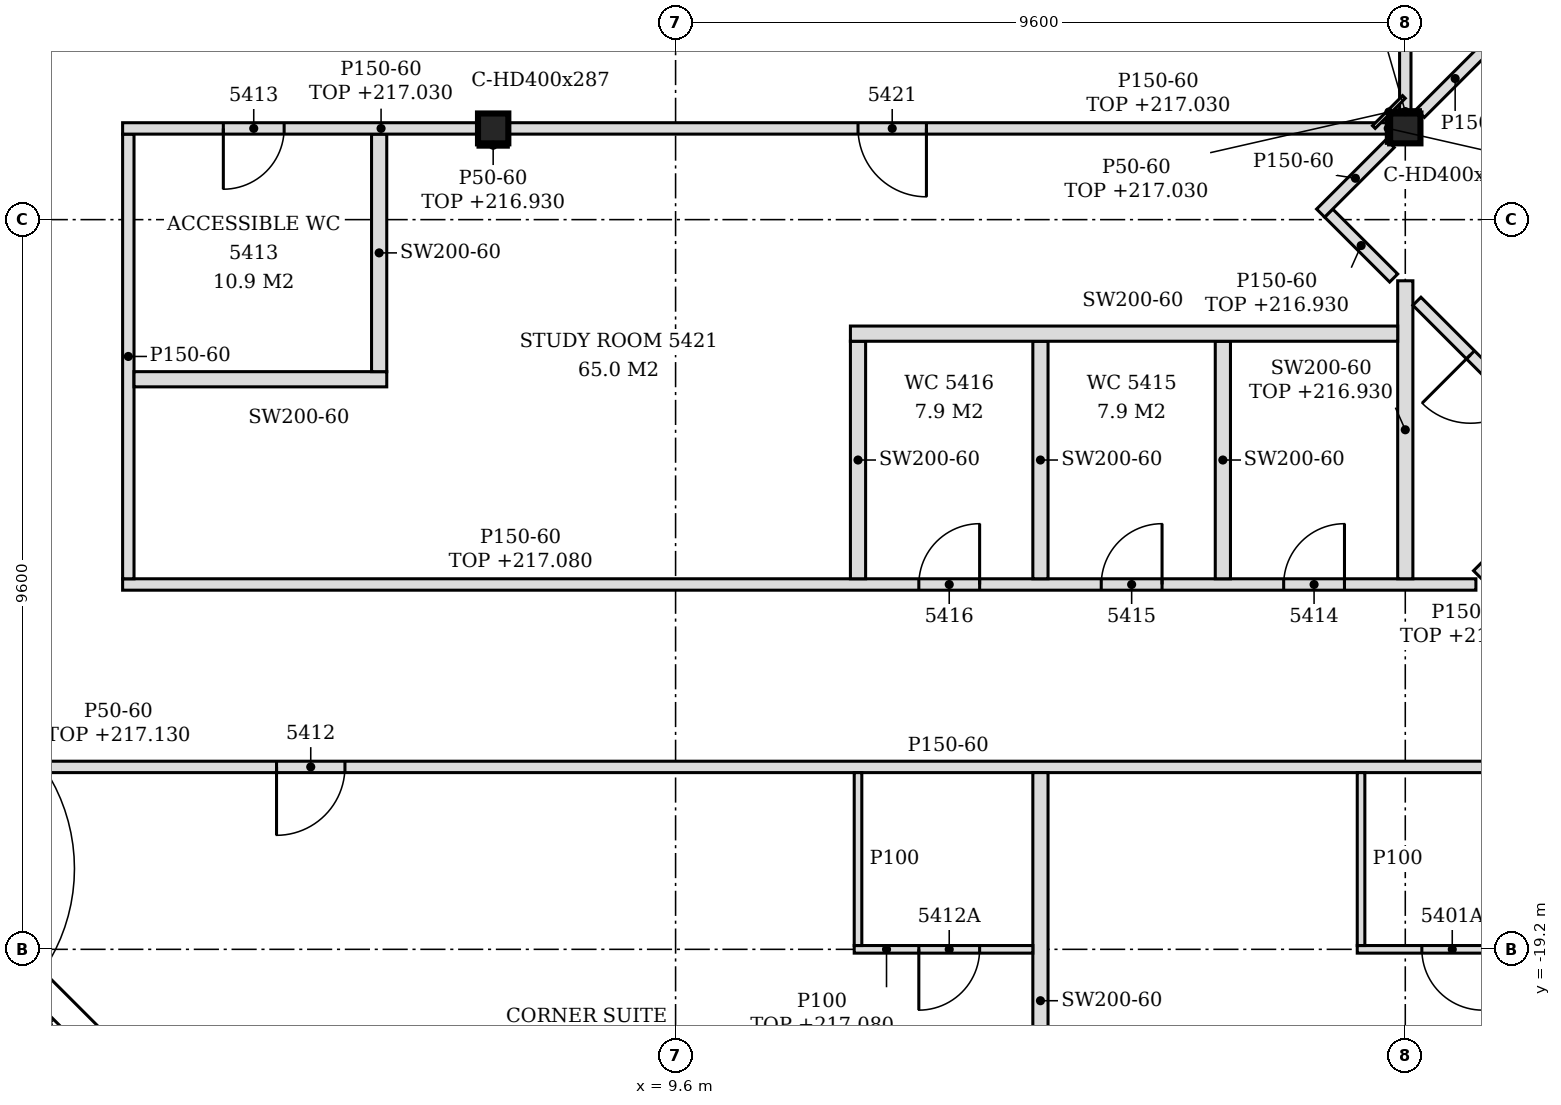
"""IFC4 building model, lengths in metres.
Left out: names, types, materials, properties, quantities, classifications, styles, units other than length and angle.
Written with IfcOpenShell. Run it as: python <this file> out.ifc"""

import sys

from ifc_helpers import new_model, si_unit, direction, frame, frame_2d, origin, origin_2d, place, context, subcontext, project, spatial, polyline, rectangle, i_section, outline, extrude, element, fill, save


model = new_model("IFC4")
c1 = context("Model", 3, precision=1e-05, world=origin(), true_north=direction((0.0, 1.0)))
c2 = subcontext(c1, "Body", "Model", "MODEL_VIEW")
j1 = project(units=[si_unit("LENGTHUNIT", "METRE"), si_unit("PLANEANGLEUNIT", "RADIAN")], contexts=[c1])
p1 = place(None, origin())
s1 = spatial("IfcSite", under=j1, at=p1, CompositionType="ELEMENT")
p2 = place(p1, origin())
s2 = spatial("IfcBuilding", under=s1, at=p2, CompositionType="ELEMENT")
p3 = place(p2, frame((0.0, 0.0, 214.2)))
s3 = spatial("IfcBuildingStorey", under=s2, at=p3, CompositionType="ELEMENT", Elevation=214.2)
for number, where, z_axis, x_axis in (
    (1, (7.2, -8.4, -0.15), (0.0, 0.0, 1.0), (1.0, 0.0, 0.0)),
    (2, (19.2, -8.4, -0.15), (0.0, 0.0, 1.0), (1.0, 0.0, 0.0)),
):
    element("IfcColumn", number, at=place(p3, frame(where, z_axis=z_axis, x_axis=x_axis)), inside=s3, PredefinedType="COLUMN", context=c2, shape_type="SweptSolid", body=[
        extrude(i_section(OverallWidth=0.399, OverallDepth=0.393, WebThickness=0.023, FlangeThickness=0.037, FilletRadius=0.015, at=origin_2d()), origin(), (0.0, 0.0, 1.0), 3.6),
    ])
p4 = place(p3, frame((-1.427, -17.42, 0.0), z_axis=(0.0, 0.0, 1.0), x_axis=(0.707106781187, -0.707106781187, 0.0)))
e3 = element("IfcWall", 3, at=p4, inside=s3, PredefinedType="NOTDEFINED", context=c2, shape_type="SweptSolid", body=[
    extrude(rectangle(XDim=4.431, YDim=0.2, at=frame_2d((2.216, 0.0))), origin(), (0.0, 0.0, 1.0), 3.45),
])
p5 = place(p4, frame((1.015, 0.0, 0.0)))
e4 = element("IfcOpeningElement", 4, at=p5, cuts=e3, PredefinedType="OPENING", context=c2, shape_type="SweptSolid", body=[
    extrude(rectangle(XDim=2.4, YDim=2.4, at=frame_2d((1.2, 1.2))), frame((0.0, 0.11, 0.0), z_axis=(0.0, -1.0, 0.0), x_axis=(1.0, 0.0, 0.0)), (0.0, 0.0, 1.0), 0.22),
])
p6 = place(p3, frame((14.4, -22.877, 0.0), z_axis=(0.0, 0.0, 1.0), x_axis=(0.0, 1.0, 0.0)))
e5 = element("IfcWall", 5, at=p6, inside=s3, PredefinedType="PARTITIONING", context=c2, shape_type="SweptSolid", body=[
    extrude(outline(polyline([(0.0, 0.0), (6.002, 0.0), (6.002, 3.45), (3.782, 3.45), (3.78, 2.88), (3.572, 2.88), (3.57, 3.45), (0.0, 3.45), (0.0, 0.0)])), frame((0.0, 0.1, 0.0), z_axis=(0.0, -1.0, 0.0), x_axis=(1.0, 0.0, 0.0)), (0.0, 0.0, 1.0), 0.2),
])
p7 = place(p3, frame((11.95, -19.2, 0.0), z_axis=(0.0, 0.0, 1.0), x_axis=(1.0, 0.0, 0.0)))
e6 = element("IfcWall", 6, at=p7, inside=s3, PredefinedType="PARTITIONING", context=c2, shape_type="SweptSolid", body=[
    extrude(rectangle(XDim=2.35, YDim=0.1, at=frame_2d((1.175, 0.0))), origin(), (0.0, 0.0, 1.0), 2.88),
])
p8 = place(p7, frame((0.85, 0.0, 0.0)))
e7 = element("IfcOpeningElement", 7, at=p8, cuts=e6, PredefinedType="OPENING", context=c2, shape_type="SweptSolid", body=[
    extrude(rectangle(XDim=0.8, YDim=2.1, at=frame_2d((0.4, 1.05))), frame((0.0, 0.06, 0.0), z_axis=(0.0, -1.0, 0.0), x_axis=(1.0, 0.0, 0.0)), (0.0, 0.0, 1.0), 0.12),
])
p9 = place(p3, frame((18.568, -19.2, 0.0), z_axis=(0.0, 0.0, 1.0), x_axis=(1.0, 0.0, 0.0)))
e8 = element("IfcWall", 8, at=p9, inside=s3, PredefinedType="PARTITIONING", context=c2, shape_type="SweptSolid", body=[
    extrude(outline(polyline([(0.0, 0.0), (2.5, 0.0), (2.5, 2.88), (0.782, 2.88), (0.78, 2.73), (0.482, 2.73), (0.48, 2.88), (0.0, 2.88), (0.0, 0.0)])), frame((0.0, 0.05, 0.0), z_axis=(0.0, -1.0, 0.0), x_axis=(1.0, 0.0, 0.0)), (0.0, 0.0, 1.0), 0.1),
])
p10 = place(p9, frame((0.85, 0.0, 0.0)))
e9 = element("IfcOpeningElement", 9, at=p10, cuts=e8, PredefinedType="OPENING", context=c2, shape_type="SweptSolid", body=[
    extrude(rectangle(XDim=0.8, YDim=2.1, at=frame_2d((0.4, 1.05))), frame((0.0, 0.06, 0.0), z_axis=(0.0, -1.0, 0.0), x_axis=(1.0, 0.0, 0.0)), (0.0, 0.0, 1.0), 0.12),
])
for number, where, z_axis, x_axis in (
    (10, (12.0, -19.15, 0.0), (0.0, 0.0, 1.0), (0.0, 1.0, 0.0)),
    (11, (18.618, -19.15, 0.0), (0.0, 0.0, 1.0), (0.0, 1.0, 0.0)),
):
    element("IfcWall", number, at=place(p3, frame(where, z_axis=z_axis, x_axis=x_axis)), inside=s3, PredefinedType="PARTITIONING", context=c2, shape_type="SweptSolid", body=[
        extrude(outline(polyline([(0.0, 0.0), (2.275, 0.0), (2.275, 3.45), (0.055, 3.45), (0.053, 2.88), (0.0, 2.88), (0.0, 0.0)])), frame((0.0, 0.05, 0.0), z_axis=(0.0, -1.0, 0.0), x_axis=(1.0, 0.0, 0.0)), (0.0, 0.0, 1.0), 0.1),
    ])
p11 = place(p3, frame((-0.844, -16.8, 0.0), z_axis=(0.0, 0.0, 1.0), x_axis=(1.0, 0.0, 0.0)))
e12 = element("IfcWall", 12, at=p11, inside=s3, PredefinedType="PARTITIONING", context=c2, shape_type="SweptSolid", body=[
    extrude(outline(polyline([(0.0, 0.0), (21.968, 0.0), (21.968, 3.45), (20.194, 3.45), (20.191, 2.73), (19.894, 2.73), (19.892, 3.45), (8.194, 3.45), (8.191, 2.73), (7.894, 2.73), (7.892, 3.45), (0.0, 3.45), (0.0, 0.0)])), frame((0.0, 0.075, 0.0), z_axis=(0.0, -1.0, 0.0), x_axis=(1.0, 0.0, 0.0)), (0.0, 0.0, 1.0), 0.15),
])
p12 = place(p11, frame((5.194, 0.0, 0.0)))
e13 = element("IfcOpeningElement", 13, at=p12, cuts=e12, PredefinedType="OPENING", context=c2, shape_type="SweptSolid", body=[
    extrude(rectangle(XDim=0.9, YDim=2.1, at=frame_2d((0.45, 1.05))), frame((0.0, 0.085, 0.0), z_axis=(0.0, -1.0, 0.0), x_axis=(1.0, 0.0, 0.0)), (0.0, 0.0, 1.0), 0.17),
])
p13 = place(p3, frame((2.325, -14.4, 0.0), z_axis=(0.0, 0.0, 1.0), x_axis=(1.0, 0.0, 0.0)))
e14 = element("IfcWall", 14, at=p13, inside=s3, PredefinedType="PARTITIONING", context=c2, shape_type="SweptSolid", body=[
    extrude(outline(polyline([(0.0, 0.0), (17.804, 0.0), (17.804, 2.88), (17.025, 2.88), (17.023, 2.73), (16.725, 2.73), (16.723, 2.88), (5.025, 2.88), (5.023, 2.73), (4.725, 2.73), (4.723, 2.88), (0.0, 2.88), (0.0, 0.0)])), frame((0.0, 0.075, 0.0), z_axis=(0.0, -1.0, 0.0), x_axis=(1.0, 0.0, 0.0)), (0.0, 0.0, 1.0), 0.15),
])
p14 = place(p13, frame((15.275, 0.0, 0.0)))
e15 = element("IfcOpeningElement", 15, at=p14, cuts=e14, PredefinedType="OPENING", context=c2, shape_type="SweptSolid", body=[
    extrude(rectangle(XDim=0.8, YDim=2.1, at=frame_2d((0.4, 1.05))), frame((0.0, 0.085, 0.0), z_axis=(0.0, -1.0, 0.0), x_axis=(1.0, 0.0, 0.0)), (0.0, 0.0, 1.0), 0.17),
])
p15 = place(p13, frame((12.875, 0.0, 0.0)))
e16 = element("IfcOpeningElement", 16, at=p15, cuts=e14, PredefinedType="OPENING", context=c2, shape_type="SweptSolid", body=[
    extrude(rectangle(XDim=0.8, YDim=2.1, at=frame_2d((0.4, 1.05))), frame((0.0, 0.085, 0.0), z_axis=(0.0, -1.0, 0.0), x_axis=(1.0, 0.0, 0.0)), (0.0, 0.0, 1.0), 0.17),
])
p16 = place(p13, frame((10.475, 0.0, 0.0)))
e17 = element("IfcOpeningElement", 17, at=p16, cuts=e14, PredefinedType="OPENING", context=c2, shape_type="SweptSolid", body=[
    extrude(rectangle(XDim=0.8, YDim=2.1, at=frame_2d((0.4, 1.05))), frame((0.0, 0.085, 0.0), z_axis=(0.0, -1.0, 0.0), x_axis=(1.0, 0.0, 0.0)), (0.0, 0.0, 1.0), 0.17),
])
p17 = place(p3, frame((2.4, -14.325, 0.0), z_axis=(0.0, 0.0, 1.0), x_axis=(0.0, 1.0, 0.0)))
e18 = element("IfcWall", 18, at=p17, inside=s3, PredefinedType="PARTITIONING", context=c2, shape_type="SweptSolid", body=[
    extrude(outline(polyline([(0.0, 0.0), (5.85, 0.0), (5.85, 2.83), (5.775, 2.83), (5.773, 3.45), (0.025, 3.45), (0.023, 2.93), (0.0, 2.93), (0.0, 0.0)])), frame((0.0, 0.075, 0.0), z_axis=(0.0, -1.0, 0.0), x_axis=(1.0, 0.0, 0.0)), (0.0, 0.0, 1.0), 0.15),
])
for number, where, z_axis, x_axis in (
    (19, (12.0, -14.325, 0.0), (0.0, 0.0, 1.0), (0.0, 1.0, 0.0)),
    (20, (14.4, -14.325, 0.0), (0.0, 0.0, 1.0), (0.0, 1.0, 0.0)),
    (21, (16.8, -14.325, 0.0), (0.0, 0.0, 1.0), (0.0, 1.0, 0.0)),
):
    element("IfcWall", number, at=place(p3, frame(where, z_axis=z_axis, x_axis=x_axis)), inside=s3, PredefinedType="PARTITIONING", context=c2, shape_type="SweptSolid", body=[
        extrude(outline(polyline([(0.0, 0.0), (3.125, 0.0), (3.125, 3.45), (0.03, 3.45), (0.028, 2.88), (0.0, 2.88), (0.0, 0.0)])), frame((0.0, 0.1, 0.0), z_axis=(0.0, -1.0, 0.0), x_axis=(1.0, 0.0, 0.0)), (0.0, 0.0, 1.0), 0.2),
    ])
p18 = place(p3, frame((19.2, -14.325, 0.0), z_axis=(0.0, 0.0, 1.0), x_axis=(0.0, 1.0, 0.0)))
e22 = element("IfcWall", 22, at=p18, inside=s3, PredefinedType="PARTITIONING", context=c2, shape_type="SweptSolid", body=[
    extrude(rectangle(XDim=3.92, YDim=0.2, at=frame_2d((1.96, 0.0))), origin(), (0.0, 0.0, 1.0), 2.73),
])
p19 = place(p3, frame((20.151, -14.272, 0.0), z_axis=(0.0, 0.0, 1.0), x_axis=(0.707106781187, 0.707106781187, 0.0)))
e23 = element("IfcWall", 23, at=p19, inside=s3, PredefinedType="PARTITIONING", context=c2, shape_type="SweptSolid", body=[
    extrude(rectangle(XDim=2.055, YDim=0.15, at=frame_2d((1.027, 0.0))), origin(), (0.0, 0.0, 1.0), 2.88),
])
p20 = place(p3, frame((21.498, -12.819, 0.0), z_axis=(0.0, 0.0, 1.0), x_axis=(-0.707106781187, 0.707106781187, 0.0)))
e24 = element("IfcWall", 24, at=p20, inside=s3, PredefinedType="PARTITIONING", context=c2, shape_type="SweptSolid", body=[
    extrude(rectangle(XDim=3.033, YDim=0.15, at=frame_2d((1.517, 0.0))), origin(), (0.0, 0.0, 1.0), 2.73),
])
p21 = place(p20, frame((1.137, 0.0, 0.0)))
e25 = element("IfcOpeningElement", 25, at=p21, cuts=e24, PredefinedType="OPENING", context=c2, shape_type="SweptSolid", body=[
    extrude(rectangle(XDim=0.9, YDim=2.1, at=frame_2d((0.45, 1.05))), frame((0.0, 0.085, 0.0), z_axis=(0.0, -1.0, 0.0), x_axis=(1.0, 0.0, 0.0)), (0.0, 0.0, 1.0), 0.17),
])
p22 = place(p3, frame((2.475, -11.7, 0.0), z_axis=(0.0, 0.0, 1.0), x_axis=(1.0, 0.0, 0.0)))
e26 = element("IfcWall", 26, at=p22, inside=s3, PredefinedType="PARTITIONING", context=c2, shape_type="SweptSolid", body=[
    extrude(rectangle(XDim=3.325, YDim=0.2, at=frame_2d((1.663, 0.0))), origin(), (0.0, 0.0, 1.0), 3.45),
])
p23 = place(p3, frame((5.7, -11.6, 0.0), z_axis=(0.0, 0.0, 1.0), x_axis=(0.0, 1.0, 0.0)))
e27 = element("IfcWall", 27, at=p23, inside=s3, PredefinedType="PARTITIONING", context=c2, shape_type="SweptSolid", body=[
    extrude(outline(polyline([(0.0, 0.0), (3.125, 0.0), (3.125, 2.83), (3.05, 2.83), (3.048, 3.45), (0.0, 3.45), (0.0, 0.0)])), frame((0.0, 0.1, 0.0), z_axis=(0.0, -1.0, 0.0), x_axis=(1.0, 0.0, 0.0)), (0.0, 0.0, 1.0), 0.2),
])
p24 = place(p3, frame((11.9, -11.1, 0.0), z_axis=(0.0, 0.0, 1.0), x_axis=(1.0, 0.0, 0.0)))
e28 = element("IfcWall", 28, at=p24, inside=s3, PredefinedType="PARTITIONING", context=c2, shape_type="SweptSolid", body=[
    extrude(outline(polyline([(0.0, 0.0), (7.2, 0.0), (7.2, 2.73), (7.15, 2.73), (7.148, 3.45), (0.0, 3.45), (0.0, 0.0)])), frame((0.0, 0.1, 0.0), z_axis=(0.0, -1.0, 0.0), x_axis=(1.0, 0.0, 0.0)), (0.0, 0.0, 1.0), 0.2),
])
p25 = place(p3, frame((19.047, -10.368, 0.0), z_axis=(0.0, 0.0, 1.0), x_axis=(-0.707409718716, 0.706803713817, 0.0)))
e29 = element("IfcWall", 29, at=p25, inside=s3, PredefinedType="PARTITIONING", context=c2, shape_type="SweptSolid", body=[
    extrude(rectangle(XDim=1.208, YDim=0.15, at=frame_2d((0.604, 0.0))), origin(), (0.0, 0.0, 1.0), 2.73),
])
p26 = place(p3, frame((18.086, -9.514, 0.0), z_axis=(0.0, 0.0, 1.0), x_axis=(0.707106781187, 0.707106781187, 0.0)))
e30 = element("IfcWall", 30, at=p26, inside=s3, PredefinedType="PARTITIONING", context=c2, shape_type="SweptSolid", body=[
    extrude(rectangle(XDim=1.295, YDim=0.15, at=frame_2d((0.648, 0.0))), origin(), (0.0, 0.0, 1.0), 3.45),
])
p27 = place(p3, frame((2.325, -8.4, 0.0), z_axis=(0.0, 0.0, 1.0), x_axis=(1.0, 0.0, 0.0)))
e31 = element("IfcWall", 31, at=p27, inside=s3, PredefinedType="PARTITIONING", context=c2, shape_type="SweptSolid", body=[
    extrude(rectangle(XDim=4.676, YDim=0.15, at=frame_2d((2.338, 0.0))), origin(), (0.0, 0.0, 1.0), 2.83),
])
p28 = place(p27, frame((1.325, 0.0, 0.0)))
e32 = element("IfcOpeningElement", 32, at=p28, cuts=e31, PredefinedType="OPENING", context=c2, shape_type="SweptSolid", body=[
    extrude(rectangle(XDim=0.8, YDim=2.1, at=frame_2d((0.4, 1.05))), frame((0.0, 0.085, 0.0), z_axis=(0.0, -1.0, 0.0), x_axis=(1.0, 0.0, 0.0)), (0.0, 0.0, 1.0), 0.17),
])
p29 = place(p3, frame((7.399, -8.4, 0.0), z_axis=(0.0, 0.0, 1.0), x_axis=(1.0, 0.0, 0.0)))
e33 = element("IfcWall", 33, at=p29, inside=s3, PredefinedType="PARTITIONING", context=c2, shape_type="SweptSolid", body=[
    extrude(rectangle(XDim=11.601, YDim=0.15, at=frame_2d((5.801, 0.0))), origin(), (0.0, 0.0, 1.0), 2.83),
])
p30 = place(p29, frame((4.601, 0.0, 0.0)))
e34 = element("IfcOpeningElement", 34, at=p30, cuts=e33, PredefinedType="OPENING", context=c2, shape_type="SweptSolid", body=[
    extrude(rectangle(XDim=0.9, YDim=2.1, at=frame_2d((0.45, 1.05))), frame((0.0, 0.085, 0.0), z_axis=(0.0, -1.0, 0.0), x_axis=(1.0, 0.0, 0.0)), (0.0, 0.0, 1.0), 0.17),
])
p31 = place(p3, frame((19.2, -8.204, 0.0), z_axis=(0.0, 0.0, 1.0), x_axis=(0.0, 1.0, 0.0)))
e35 = element("IfcWall", 35, at=p31, inside=s3, PredefinedType="PARTITIONING", context=c2, shape_type="SweptSolid", body=[
    extrude(rectangle(XDim=4.529, YDim=0.15, at=frame_2d((2.264, 0.0))), origin(), (0.0, 0.0, 1.0), 2.83),
])
p32 = place(p3, frame((19.398, -8.202, 0.0), z_axis=(0.0, 0.0, 1.0), x_axis=(0.707200993001, 0.707012556818, 0.0)))
e36 = element("IfcWall", 36, at=p32, inside=s3, PredefinedType="PARTITIONING", context=c2, shape_type="SweptSolid", body=[
    extrude(rectangle(XDim=1.296, YDim=0.15, at=frame_2d((0.648, 0.0))), origin(), (0.0, 0.0, 1.0), 3.45),
])
p33 = place(p3, frame((18.786, -8.382, 0.0), z_axis=(0.0, 0.0, 1.0), x_axis=(0.707106781187, 0.707106781187, 0.0)))
e37 = element("IfcWall", 37, at=p33, inside=s3, PredefinedType="PARTITIONING", context=c2, shape_type="SweptSolid", body=[
    extrude(rectangle(XDim=0.56, YDim=0.05, at=frame_2d((0.28, 0.0))), origin(), (0.0, 0.0, 1.0), 2.83),
])
p34 = place(p3, frame((7.0, -8.622, 0.0), z_axis=(0.0, 0.0, 1.0), x_axis=(1.0, 0.0, 0.0)))
e38 = element("IfcWall", 38, at=p34, inside=s3, PredefinedType="PARTITIONING", context=c2, shape_type="SweptSolid", body=[
    extrude(rectangle(XDim=0.399, YDim=0.05, at=frame_2d((0.199, 0.0))), origin(), (0.0, 0.0, 1.0), 2.73),
])
p35 = place(p3, frame((19.0, -8.178, 0.0), z_axis=(0.0, 0.0, 1.0), x_axis=(1.0, 0.0, 0.0)))
e39 = element("IfcWall", 39, at=p35, inside=s3, PredefinedType="PARTITIONING", context=c2, shape_type="SweptSolid", body=[
    extrude(rectangle(XDim=0.399, YDim=0.05, at=frame_2d((0.199, 0.0))), origin(), (0.0, 0.0, 1.0), 2.83),
])
p36 = place(p3, frame((18.976, -8.596, 0.0), z_axis=(0.0, 0.0, 1.0), x_axis=(0.0, 1.0, 0.0)))
e40 = element("IfcWall", 40, at=p36, inside=s3, PredefinedType="PARTITIONING", context=c2, shape_type="SweptSolid", body=[
    extrude(rectangle(XDim=0.393, YDim=0.05, at=frame_2d((0.196, 0.0))), origin(), (0.0, 0.0, 1.0), 2.83),
])
p37 = place(p10, frame((0.8, 0.0, 0.0), z_axis=(0.0, 0.0, 1.0), x_axis=(-1.0, 0.0, 0.0)))
e41 = element("IfcDoor", 41, at=p37, inside=s3, OperationType="SINGLE_SWING_LEFT", PredefinedType="DOOR", context=c2, shape_type="SweptSolid", body=[
    extrude(rectangle(XDim=0.8, YDim=2.1, at=frame_2d((0.4, 1.05))), frame((0.0, 0.025, 0.0), z_axis=(0.0, -1.0, 0.0), x_axis=(1.0, 0.0, 0.0)), (0.0, 0.0, 1.0), 0.05),
])
fill(e9, e41)
p38 = place(p12, frame((0.9, 0.0, 0.0), z_axis=(0.0, 0.0, 1.0), x_axis=(-1.0, 0.0, 0.0)))
e42 = element("IfcDoor", 42, at=p38, inside=s3, OperationType="SINGLE_SWING_RIGHT", PredefinedType="DOOR", context=c2, shape_type="SweptSolid", body=[
    extrude(rectangle(XDim=0.9, YDim=2.1, at=frame_2d((0.45, 1.05))), frame((0.0, 0.025, 0.0), z_axis=(0.0, -1.0, 0.0), x_axis=(1.0, 0.0, 0.0)), (0.0, 0.0, 1.0), 0.05),
])
fill(e13, e42)
p39 = place(p8, frame((0.8, 0.0, 0.0), z_axis=(0.0, 0.0, 1.0), x_axis=(-1.0, 0.0, 0.0)))
e43 = element("IfcDoor", 43, at=p39, inside=s3, OperationType="SINGLE_SWING_RIGHT", PredefinedType="DOOR", context=c2, shape_type="SweptSolid", body=[
    extrude(rectangle(XDim=0.8, YDim=2.1, at=frame_2d((0.4, 1.05))), frame((0.0, 0.025, 0.0), z_axis=(0.0, -1.0, 0.0), x_axis=(1.0, 0.0, 0.0)), (0.0, 0.0, 1.0), 0.05),
])
fill(e7, e43)
p40 = place(p28, frame((0.8, 0.0, 0.0), z_axis=(0.0, 0.0, 1.0), x_axis=(-1.0, 0.0, 0.0)))
e44 = element("IfcDoor", 44, at=p40, inside=s3, OperationType="SINGLE_SWING_RIGHT", PredefinedType="DOOR", context=c2, shape_type="SweptSolid", body=[
    extrude(rectangle(XDim=0.8, YDim=2.1, at=frame_2d((0.4, 1.05))), frame((0.0, 0.025, 0.0), z_axis=(0.0, -1.0, 0.0), x_axis=(1.0, 0.0, 0.0)), (0.0, 0.0, 1.0), 0.05),
])
fill(e32, e44)
p41 = place(p14, origin())
e45 = element("IfcDoor", 45, at=p41, inside=s3, OperationType="SINGLE_SWING_RIGHT", PredefinedType="DOOR", context=c2, shape_type="SweptSolid", body=[
    extrude(rectangle(XDim=0.8, YDim=2.1, at=frame_2d((0.4, 1.05))), frame((0.0, 0.025, 0.0), z_axis=(0.0, -1.0, 0.0), x_axis=(1.0, 0.0, 0.0)), (0.0, 0.0, 1.0), 0.05),
])
fill(e15, e45)
p42 = place(p15, origin())
e46 = element("IfcDoor", 46, at=p42, inside=s3, OperationType="SINGLE_SWING_RIGHT", PredefinedType="DOOR", context=c2, shape_type="SweptSolid", body=[
    extrude(rectangle(XDim=0.8, YDim=2.1, at=frame_2d((0.4, 1.05))), frame((0.0, 0.025, 0.0), z_axis=(0.0, -1.0, 0.0), x_axis=(1.0, 0.0, 0.0)), (0.0, 0.0, 1.0), 0.05),
])
fill(e16, e46)
p43 = place(p16, origin())
e47 = element("IfcDoor", 47, at=p43, inside=s3, OperationType="SINGLE_SWING_RIGHT", PredefinedType="DOOR", context=c2, shape_type="SweptSolid", body=[
    extrude(rectangle(XDim=0.8, YDim=2.1, at=frame_2d((0.4, 1.05))), frame((0.0, 0.025, 0.0), z_axis=(0.0, -1.0, 0.0), x_axis=(1.0, 0.0, 0.0)), (0.0, 0.0, 1.0), 0.05),
])
fill(e17, e47)
p44 = place(p21, origin())
e48 = element("IfcDoor", 48, at=p44, inside=s3, OperationType="SINGLE_SWING_RIGHT", PredefinedType="DOOR", context=c2, shape_type="SweptSolid", body=[
    extrude(rectangle(XDim=0.9, YDim=2.1, at=frame_2d((0.45, 1.05))), frame((0.0, 0.025, 0.0), z_axis=(0.0, -1.0, 0.0), x_axis=(1.0, 0.0, 0.0)), (0.0, 0.0, 1.0), 0.05),
])
fill(e25, e48)
p45 = place(p30, frame((0.9, 0.0, 0.0), z_axis=(0.0, 0.0, 1.0), x_axis=(-1.0, 0.0, 0.0)))
e49 = element("IfcDoor", 49, at=p45, inside=s3, OperationType="SINGLE_SWING_LEFT", PredefinedType="DOOR", context=c2, shape_type="SweptSolid", body=[
    extrude(rectangle(XDim=0.9, YDim=2.1, at=frame_2d((0.45, 1.05))), frame((0.0, 0.025, 0.0), z_axis=(0.0, -1.0, 0.0), x_axis=(1.0, 0.0, 0.0)), (0.0, 0.0, 1.0), 0.05),
])
fill(e34, e49)
save(model, sys.argv[1])
